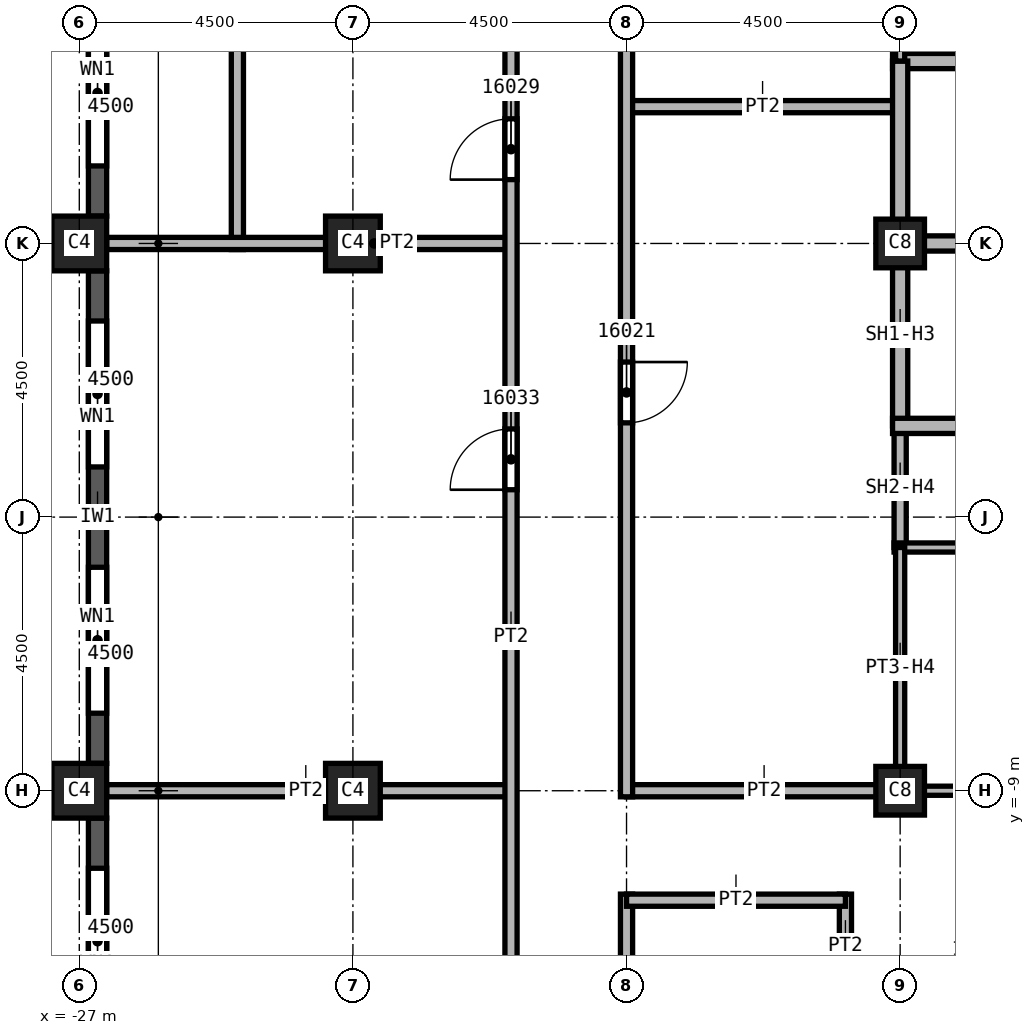
"""IFC4 building model, lengths in metres.
Left out: names, types, materials, properties, quantities, classifications, styles, units other than length and angle.
Written with IfcOpenShell. Run it as: python <this file> out.ifc"""

import sys

from ifc_helpers import new_model, si_unit, direction, frame, frame_2d, origin, origin_2d, place, context, subcontext, project, spatial, rectangle, extrude, element, fill, save


model = new_model("IFC4")
c1 = context("Model", 3, precision=1e-05, world=origin(), true_north=direction((0.0, 1.0)))
c2 = subcontext(c1, "Body", "Model", "MODEL_VIEW")
j1 = project(units=[si_unit("LENGTHUNIT", "METRE"), si_unit("PLANEANGLEUNIT", "RADIAN")], contexts=[c1])
p1 = place(None, origin())
s1 = spatial("IfcSite", under=j1, at=p1, CompositionType="ELEMENT")
p2 = place(p1, origin())
s2 = spatial("IfcBuilding", under=s1, at=p2, CompositionType="ELEMENT")
p3 = place(p2, frame((0.0, 0.0, 246.0)))
s3 = spatial("IfcBuildingStorey", under=s2, at=p3, CompositionType="ELEMENT", Elevation=246.0)
for number, where, z_axis, x_axis in (
    (1, (-22.5, 0.0, 0.0), (0.0, 0.0, 1.0), (1.0, 0.0, 0.0)),
    (2, (-22.5, -9.0, 0.0), (0.0, 0.0, 1.0), (1.0, 0.0, 0.0)),
):
    element("IfcColumn", number, at=place(p3, frame(where, z_axis=z_axis, x_axis=x_axis)), inside=s3, PredefinedType="COLUMN", context=c2, shape_type="SweptSolid", body=[
        extrude(rectangle(XDim=0.9, YDim=0.9, at=origin_2d()), origin(), (0.0, 0.0, 1.0), 3.72),
    ])
for number, where, z_axis, x_axis in (
    (3, (-13.5, 0.0, 0.0), (0.0, 0.0, 1.0), (1.0, 0.0, 0.0)),
    (4, (-13.5, -9.0, 0.0), (0.0, 0.0, 1.0), (1.0, 0.0, 0.0)),
):
    element("IfcColumn", number, at=place(p3, frame(where, z_axis=z_axis, x_axis=x_axis)), inside=s3, PredefinedType="COLUMN", context=c2, shape_type="SweptSolid", body=[
        extrude(rectangle(XDim=0.8, YDim=0.8, at=origin_2d()), origin(), (0.0, 0.0, 1.0), 3.72),
    ])
for number, where, z_axis, x_axis in (
    (5, (-27.0, 0.0, 0.0), (0.0, 0.0, 1.0), (0.0, 1.0, 0.0)),
    (6, (-27.0, -9.0, 0.0), (0.0, 0.0, 1.0), (0.0, 1.0, 0.0)),
):
    element("IfcColumn", number, at=place(p3, frame(where, z_axis=z_axis, x_axis=x_axis)), inside=s3, PredefinedType="COLUMN", context=c2, shape_type="SweptSolid", body=[
        extrude(rectangle(XDim=0.9, YDim=0.9, at=origin_2d()), origin(), (0.0, 0.0, 1.0), 3.72),
    ])
p4 = place(p3, frame((-26.7, 8.55, 0.0), z_axis=(0.0, 0.0, 1.0), x_axis=(0.0, -1.0, 0.0)))
e7 = element("IfcWall", 7, at=p4, inside=s3, PredefinedType="SOLIDWALL", context=c2, shape_type="SweptSolid", body=[
    extrude(rectangle(XDim=8.1, YDim=0.3, at=frame_2d((4.05, 0.0))), origin(), (0.0, 0.0, 1.0), 3.12),
])
p5 = place(p4, frame((0.825, 0.0, 0.8)))
e8 = element("IfcOpeningElement", 8, at=p5, cuts=e7, PredefinedType="OPENING", context=c2, shape_type="SweptSolid", body=[
    extrude(rectangle(XDim=2.4, YDim=1.95, at=frame_2d((1.2, 0.975))), frame((0.0, 0.15, 0.0), z_axis=(0.0, -1.0, 0.0), x_axis=(1.0, 0.0, 0.0)), (0.0, 0.0, 1.0), 0.3),
])
p6 = place(p4, frame((4.875, 0.0, 0.8)))
e9 = element("IfcOpeningElement", 9, at=p6, cuts=e7, PredefinedType="OPENING", context=c2, shape_type="SweptSolid", body=[
    extrude(rectangle(XDim=2.4, YDim=1.95, at=frame_2d((1.2, 0.975))), frame((0.0, 0.15, 0.0), z_axis=(0.0, -1.0, 0.0), x_axis=(1.0, 0.0, 0.0)), (0.0, 0.0, 1.0), 0.3),
])
p7 = place(p3, frame((-26.7, -0.45, 0.0), z_axis=(0.0, 0.0, 1.0), x_axis=(0.0, -1.0, 0.0)))
e10 = element("IfcWall", 10, at=p7, inside=s3, PredefinedType="SOLIDWALL", context=c2, shape_type="SweptSolid", body=[
    extrude(rectangle(XDim=8.1, YDim=0.3, at=frame_2d((4.05, 0.0))), origin(), (0.0, 0.0, 1.0), 3.12),
])
p8 = place(p7, frame((0.825, 0.0, 0.8)))
e11 = element("IfcOpeningElement", 11, at=p8, cuts=e10, PredefinedType="OPENING", context=c2, shape_type="SweptSolid", body=[
    extrude(rectangle(XDim=2.4, YDim=1.95, at=frame_2d((1.2, 0.975))), frame((0.0, 0.15, 0.0), z_axis=(0.0, -1.0, 0.0), x_axis=(1.0, 0.0, 0.0)), (0.0, 0.0, 1.0), 0.3),
])
p9 = place(p7, frame((4.875, 0.0, 0.8)))
e12 = element("IfcOpeningElement", 12, at=p9, cuts=e10, PredefinedType="OPENING", context=c2, shape_type="SweptSolid", body=[
    extrude(rectangle(XDim=2.4, YDim=1.95, at=frame_2d((1.2, 0.975))), frame((0.0, 0.15, 0.0), z_axis=(0.0, -1.0, 0.0), x_axis=(1.0, 0.0, 0.0)), (0.0, 0.0, 1.0), 0.3),
])
p10 = place(p3, frame((-26.7, -9.45, 0.0), z_axis=(0.0, 0.0, 1.0), x_axis=(0.0, -1.0, 0.0)))
e13 = element("IfcWall", 13, at=p10, inside=s3, PredefinedType="SOLIDWALL", context=c2, shape_type="SweptSolid", body=[
    extrude(rectangle(XDim=8.1, YDim=0.3, at=frame_2d((4.05, 0.0))), origin(), (0.0, 0.0, 1.0), 3.12),
])
p11 = place(p10, frame((0.825, 0.0, 0.8)))
e14 = element("IfcOpeningElement", 14, at=p11, cuts=e13, PredefinedType="OPENING", context=c2, shape_type="SweptSolid", body=[
    extrude(rectangle(XDim=2.4, YDim=1.95, at=frame_2d((1.2, 0.975))), frame((0.0, 0.15, 0.0), z_axis=(0.0, -1.0, 0.0), x_axis=(1.0, 0.0, 0.0)), (0.0, 0.0, 1.0), 0.3),
])
p12 = place(p10, frame((4.875, 0.0, 0.8)))
e15 = element("IfcOpeningElement", 15, at=p12, cuts=e13, PredefinedType="OPENING", context=c2, shape_type="SweptSolid", body=[
    extrude(rectangle(XDim=2.4, YDim=1.95, at=frame_2d((1.2, 0.975))), frame((0.0, 0.15, 0.0), z_axis=(0.0, -1.0, 0.0), x_axis=(1.0, 0.0, 0.0)), (0.0, 0.0, 1.0), 0.3),
])
p13 = place(p3, frame((-26.55, -9.0, 0.0), z_axis=(0.0, 0.0, 1.0), x_axis=(1.0, 0.0, 0.0)))
e16 = element("IfcWall", 16, at=p13, inside=s3, PredefinedType="PARTITIONING", context=c2, shape_type="SweptSolid", body=[
    extrude(rectangle(XDim=6.65, YDim=0.2, at=frame_2d((3.325, 0.0))), origin(), (0.0, 0.0, 1.0), 3.72),
])
p14 = place(p3, frame((-24.4, -0.1, 0.0), z_axis=(0.0, 0.0, 1.0), x_axis=(0.0, 1.0, 0.0)))
e17 = element("IfcWall", 17, at=p14, inside=s3, PredefinedType="PARTITIONING", context=c2, shape_type="SweptSolid", body=[
    extrude(rectangle(XDim=17.65, YDim=0.2, at=frame_2d((8.825, 0.0))), origin(), (0.0, 0.0, 1.0), 3.72),
])
p15 = place(p14, frame((14.45, 0.0, 0.0)))
e18 = element("IfcOpeningElement", 18, at=p15, cuts=e17, PredefinedType="OPENING", context=c2, shape_type="SweptSolid", body=[
    extrude(rectangle(XDim=1.0, YDim=2.1, at=frame_2d((0.5, 1.05))), frame((0.0, 0.1, 0.0), z_axis=(0.0, -1.0, 0.0), x_axis=(1.0, 0.0, 0.0)), (0.0, 0.0, 1.0), 0.2),
])
p16 = place(p3, frame((-19.9, 0.0, 0.0), z_axis=(0.0, 0.0, 1.0), x_axis=(-1.0, 0.0, 0.0)))
e19 = element("IfcWall", 19, at=p16, inside=s3, PredefinedType="PARTITIONING", context=c2, shape_type="SweptSolid", body=[
    extrude(rectangle(XDim=6.65, YDim=0.2, at=frame_2d((3.325, 0.0))), origin(), (0.0, 0.0, 1.0), 3.72),
])
p17 = place(p3, frame((-19.9, -21.9, 0.0), z_axis=(0.0, 0.0, 1.0), x_axis=(0.0, 1.0, 0.0)))
e20 = element("IfcWall", 20, at=p17, inside=s3, PredefinedType="PARTITIONING", context=c2, shape_type="SweptSolid", body=[
    extrude(rectangle(XDim=35.5, YDim=0.2, at=frame_2d((17.75, 0.0))), origin(), (0.0, 0.0, 1.0), 3.72),
])
p18 = place(p17, frame((22.95, 0.0, 0.0)))
e21 = element("IfcOpeningElement", 21, at=p18, cuts=e20, PredefinedType="OPENING", context=c2, shape_type="SweptSolid", body=[
    extrude(rectangle(XDim=1.0, YDim=2.1, at=frame_2d((0.5, 1.05))), frame((0.0, 0.1, 0.0), z_axis=(0.0, -1.0, 0.0), x_axis=(1.0, 0.0, 0.0)), (0.0, 0.0, 1.0), 0.2),
])
p19 = place(p17, frame((28.8, 0.0, 0.0)))
e22 = element("IfcOpeningElement", 22, at=p19, cuts=e20, PredefinedType="OPENING", context=c2, shape_type="SweptSolid", body=[
    extrude(rectangle(XDim=1.0, YDim=2.1, at=frame_2d((0.5, 1.05))), frame((0.0, 0.1, 0.0), z_axis=(0.0, -1.0, 0.0), x_axis=(1.0, 0.0, 0.0)), (0.0, 0.0, 1.0), 0.2),
])
p20 = place(p17, frame((7.75, 0.0, 0.0)))
e23 = element("IfcOpeningElement", 23, at=p20, cuts=e20, PredefinedType="OPENING", context=c2, shape_type="SweptSolid", body=[
    extrude(rectangle(XDim=1.0, YDim=2.1, at=frame_2d((0.5, 1.05))), frame((0.0, 0.1, 0.0), z_axis=(0.0, -1.0, 0.0), x_axis=(1.0, 0.0, 0.0)), (0.0, 0.0, 1.0), 0.2),
])
p21 = place(p17, frame((17.85, 0.0, 0.0)))
e24 = element("IfcOpeningElement", 24, at=p21, cuts=e20, PredefinedType="OPENING", context=c2, shape_type="SweptSolid", body=[
    extrude(rectangle(XDim=1.0, YDim=2.1, at=frame_2d((0.5, 1.05))), frame((0.0, 0.1, 0.0), z_axis=(0.0, -1.0, 0.0), x_axis=(1.0, 0.0, 0.0)), (0.0, 0.0, 1.0), 0.2),
])
p22 = place(p3, frame((-18.0, -10.7, 0.0), z_axis=(0.0, 0.0, 1.0), x_axis=(0.0, -1.0, 0.0)))
e25 = element("IfcWall", 25, at=p22, inside=s3, PredefinedType="PARTITIONING", context=c2, shape_type="SweptSolid", body=[
    extrude(rectangle(XDim=11.2, YDim=0.2, at=frame_2d((5.6, 0.0))), origin(), (0.0, 0.0, 1.0), 3.72),
])
p23 = place(p22, frame((5.9, 0.0, 0.0)))
e26 = element("IfcOpeningElement", 26, at=p23, cuts=e25, PredefinedType="OPENING", context=c2, shape_type="SweptSolid", body=[
    extrude(rectangle(XDim=1.0, YDim=2.1, at=frame_2d((0.5, 1.05))), frame((0.0, 0.1, 0.0), z_axis=(0.0, -1.0, 0.0), x_axis=(1.0, 0.0, 0.0)), (0.0, 0.0, 1.0), 0.2),
])
for number, where, z_axis, x_axis in (
    (27, (-18.0, -9.0, 0.0), (0.0, 0.0, 1.0), (1.0, 0.0, 0.0)),
    (28, (-18.0, 2.25, 0.0), (0.0, 0.0, 1.0), (1.0, 0.0, 0.0)),
):
    element("IfcWall", number, at=place(p3, frame(where, z_axis=z_axis, x_axis=x_axis)), inside=s3, PredefinedType="PARTITIONING", context=c2, shape_type="SweptSolid", body=[
        extrude(rectangle(XDim=4.5, YDim=0.2, at=frame_2d((2.25, 0.0))), origin(), (0.0, 0.0, 1.0), 3.72),
    ])
p24 = place(p3, frame((-18.0, 9.1, 0.0), z_axis=(0.0, 0.0, 1.0), x_axis=(0.0, -1.0, 0.0)))
e29 = element("IfcWall", 29, at=p24, inside=s3, PredefinedType="PARTITIONING", context=c2, shape_type="SweptSolid", body=[
    extrude(rectangle(XDim=18.2, YDim=0.2, at=frame_2d((9.1, 0.0))), origin(), (0.0, 0.0, 1.0), 3.72),
])
p25 = place(p24, frame((11.05, 0.0, 0.0)))
e30 = element("IfcOpeningElement", 30, at=p25, cuts=e29, PredefinedType="OPENING", context=c2, shape_type="SweptSolid", body=[
    extrude(rectangle(XDim=1.0, YDim=2.1, at=frame_2d((0.5, 1.05))), frame((0.0, 0.1, 0.0), z_axis=(0.0, -1.0, 0.0), x_axis=(1.0, 0.0, 0.0)), (0.0, 0.0, 1.0), 0.2),
])
p26 = place(p24, frame((1.15, 0.0, 0.0)))
e31 = element("IfcOpeningElement", 31, at=p26, cuts=e29, PredefinedType="OPENING", context=c2, shape_type="SweptSolid", body=[
    extrude(rectangle(XDim=1.0, YDim=2.1, at=frame_2d((0.5, 1.05))), frame((0.0, 0.1, 0.0), z_axis=(0.0, -1.0, 0.0), x_axis=(1.0, 0.0, 0.0)), (0.0, 0.0, 1.0), 0.2),
])
p27 = place(p3, frame((-14.4, -12.3, 0.0), z_axis=(0.0, 0.0, 1.0), x_axis=(0.0, 1.0, 0.0)))
e32 = element("IfcWall", 32, at=p27, inside=s3, PredefinedType="PARTITIONING", context=c2, shape_type="SweptSolid", body=[
    extrude(rectangle(XDim=1.6, YDim=0.2, at=frame_2d((0.8, 0.0))), origin(), (0.0, 0.0, 1.0), 3.72),
])
p28 = place(p3, frame((-14.4, -10.8, 0.0), z_axis=(0.0, 0.0, 1.0), x_axis=(-1.0, 0.0, 0.0)))
e33 = element("IfcWall", 33, at=p28, inside=s3, PredefinedType="PARTITIONING", context=c2, shape_type="SweptSolid", body=[
    extrude(rectangle(XDim=3.6, YDim=0.2, at=frame_2d((1.8, 0.0))), origin(), (0.0, 0.0, 1.0), 3.72),
])
p29 = place(p3, frame((-13.5, -5.0, 0.0), z_axis=(0.0, 0.0, 1.0), x_axis=(0.0, 1.0, 0.0)))
e34 = element("IfcWall", 34, at=p29, inside=s3, PredefinedType="SOLIDWALL", context=c2, shape_type="SweptSolid", body=[
    extrude(rectangle(XDim=2.0, YDim=0.2, at=frame_2d((1.0, 0.0))), origin(), (0.0, 0.0, 1.0), 3.042),
])
p30 = place(p3, frame((-13.625, 0.0, 0.0), z_axis=(0.0, 0.0, 1.0), x_axis=(1.0, 0.0, 0.0)))
e35 = element("IfcWall", 35, at=p30, inside=s3, PredefinedType="SOLIDWALL", context=c2, shape_type="SweptSolid", body=[
    extrude(rectangle(XDim=3.125, YDim=0.25, at=frame_2d((1.562, 0.0))), origin(), (0.0, 0.0, 1.0), 3.72),
])
p31 = place(p3, frame((-13.625, 3.0, 0.0), z_axis=(0.0, 0.0, 1.0), x_axis=(1.0, 0.0, 0.0)))
e36 = element("IfcWall", 36, at=p31, inside=s3, PredefinedType="SOLIDWALL", context=c2, shape_type="SweptSolid", body=[
    extrude(rectangle(XDim=9.25, YDim=0.25, at=frame_2d((4.625, 0.0))), origin(), (0.0, 0.0, 1.0), 3.72),
])
p32 = place(p31, frame((3.25, 0.0, 0.0)))
e37 = element("IfcOpeningElement", 37, at=p32, cuts=e36, PredefinedType="OPENING", context=c2, shape_type="SweptSolid", body=[
    extrude(rectangle(XDim=1.1, YDim=2.1, at=frame_2d((0.55, 1.05))), frame((0.0, 0.125, 0.0), z_axis=(0.0, -1.0, 0.0), x_axis=(1.0, 0.0, 0.0)), (0.0, 0.0, 1.0), 0.25),
])
p33 = place(p3, frame((-13.5, -3.0, 0.0), z_axis=(0.0, 0.0, 1.0), x_axis=(0.0, 1.0, 0.0)))
e38 = element("IfcWall", 38, at=p33, inside=s3, PredefinedType="SOLIDWALL", context=c2, shape_type="SweptSolid", body=[
    extrude(rectangle(XDim=6.0, YDim=0.25, at=frame_2d((3.0, 0.0))), origin(), (0.0, 0.0, 1.0), 3.042),
])
p34 = place(p3, frame((-13.625, -3.0, 0.0), z_axis=(0.0, 0.0, 1.0), x_axis=(1.0, 0.0, 0.0)))
e39 = element("IfcWall", 39, at=p34, inside=s3, PredefinedType="SOLIDWALL", context=c2, shape_type="SweptSolid", body=[
    extrude(rectangle(XDim=6.125, YDim=0.25, at=frame_2d((3.062, 0.0))), origin(), (0.0, 0.0, 1.0), 3.72),
])
p35 = place(p34, frame((3.25, 0.0, 0.0)))
e40 = element("IfcOpeningElement", 40, at=p35, cuts=e39, PredefinedType="OPENING", context=c2, shape_type="SweptSolid", body=[
    extrude(rectangle(XDim=1.1, YDim=2.1, at=frame_2d((0.55, 1.05))), frame((0.0, 0.125, 0.0), z_axis=(0.0, -1.0, 0.0), x_axis=(1.0, 0.0, 0.0)), (0.0, 0.0, 1.0), 0.25),
])
p36 = place(p3, frame((-13.6, -5.0, 0.0), z_axis=(0.0, 0.0, 1.0), x_axis=(1.0, 0.0, 0.0)))
e41 = element("IfcWall", 41, at=p36, inside=s3, PredefinedType="PARTITIONING", context=c2, shape_type="SweptSolid", body=[
    extrude(rectangle(XDim=3.1, YDim=0.15, at=frame_2d((1.55, 0.0))), origin(), (0.0, 0.0, 1.0), 3.72),
])
p37 = place(p3, frame((-13.5, -9.1, 0.0), z_axis=(0.0, 0.0, 1.0), x_axis=(0.0, 1.0, 0.0)))
e42 = element("IfcWall", 42, at=p37, inside=s3, PredefinedType="PARTITIONING", context=c2, shape_type="SweptSolid", body=[
    extrude(rectangle(XDim=4.1, YDim=0.15, at=frame_2d((2.05, 0.0))), origin(), (0.0, 0.0, 1.0), 3.042),
])
p38 = place(p3, frame((-13.5, 3.0, 0.0), z_axis=(0.0, 0.0, 1.0), x_axis=(0.0, 1.0, 0.0)))
e43 = element("IfcWall", 43, at=p38, inside=s3, PredefinedType="PARTITIONING", context=c2, shape_type="SweptSolid", body=[
    extrude(rectangle(XDim=2.0, YDim=0.15, at=frame_2d((1.0, 0.0))), origin(), (0.0, 0.0, 1.0), 3.042),
])
p39 = place(p3, frame((-10.5, -9.0, 0.0), z_axis=(0.0, 0.0, 1.0), x_axis=(-1.0, 0.0, 0.0)))
e44 = element("IfcWall", 44, at=p39, inside=s3, PredefinedType="PARTITIONING", context=c2, shape_type="SweptSolid", body=[
    extrude(rectangle(XDim=3.075, YDim=0.15, at=frame_2d((1.538, 0.0))), origin(), (0.0, 0.0, 1.0), 3.042),
])
p40 = place(p6, origin())
e45 = element("IfcWindow", 45, at=p40, inside=s3, PartitioningType="SINGLE_PANEL", PredefinedType="WINDOW", context=c2, shape_type="SweptSolid", body=[
    extrude(rectangle(XDim=2.4, YDim=1.95, at=frame_2d((1.2, 0.975))), frame((0.0, 0.03, 0.0), z_axis=(0.0, -1.0, 0.0), x_axis=(1.0, 0.0, 0.0)), (0.0, 0.0, 1.0), 0.06),
])
fill(e9, e45)
p41 = place(p8, origin())
e46 = element("IfcWindow", 46, at=p41, inside=s3, PartitioningType="SINGLE_PANEL", PredefinedType="WINDOW", context=c2, shape_type="SweptSolid", body=[
    extrude(rectangle(XDim=2.4, YDim=1.95, at=frame_2d((1.2, 0.975))), frame((0.0, 0.03, 0.0), z_axis=(0.0, -1.0, 0.0), x_axis=(1.0, 0.0, 0.0)), (0.0, 0.0, 1.0), 0.06),
])
fill(e11, e46)
p42 = place(p9, origin())
e47 = element("IfcWindow", 47, at=p42, inside=s3, PartitioningType="SINGLE_PANEL", PredefinedType="WINDOW", context=c2, shape_type="SweptSolid", body=[
    extrude(rectangle(XDim=2.4, YDim=1.95, at=frame_2d((1.2, 0.975))), frame((0.0, 0.03, 0.0), z_axis=(0.0, -1.0, 0.0), x_axis=(1.0, 0.0, 0.0)), (0.0, 0.0, 1.0), 0.06),
])
fill(e12, e47)
p43 = place(p11, origin())
e48 = element("IfcWindow", 48, at=p43, inside=s3, PartitioningType="SINGLE_PANEL", PredefinedType="WINDOW", context=c2, shape_type="SweptSolid", body=[
    extrude(rectangle(XDim=2.4, YDim=1.95, at=frame_2d((1.2, 0.975))), frame((0.0, 0.03, 0.0), z_axis=(0.0, -1.0, 0.0), x_axis=(1.0, 0.0, 0.0)), (0.0, 0.0, 1.0), 0.06),
])
fill(e14, e48)
p44 = place(p25, origin())
e49 = element("IfcDoor", 49, at=p44, inside=s3, OperationType="SINGLE_SWING_RIGHT", PredefinedType="DOOR", context=c2, shape_type="SweptSolid", body=[
    extrude(rectangle(XDim=1.0, YDim=2.1, at=frame_2d((0.5, 1.05))), frame((0.0, 0.025, 0.0), z_axis=(0.0, -1.0, 0.0), x_axis=(1.0, 0.0, 0.0)), (0.0, 0.0, 1.0), 0.05),
])
fill(e30, e49)
p45 = place(p18, origin())
e50 = element("IfcDoor", 50, at=p45, inside=s3, OperationType="SINGLE_SWING_RIGHT", PredefinedType="DOOR", context=c2, shape_type="SweptSolid", body=[
    extrude(rectangle(XDim=1.0, YDim=2.1, at=frame_2d((0.5, 1.05))), frame((0.0, 0.025, 0.0), z_axis=(0.0, -1.0, 0.0), x_axis=(1.0, 0.0, 0.0)), (0.0, 0.0, 1.0), 0.05),
])
fill(e21, e50)
p46 = place(p21, origin())
e51 = element("IfcDoor", 51, at=p46, inside=s3, OperationType="SINGLE_SWING_RIGHT", PredefinedType="DOOR", context=c2, shape_type="SweptSolid", body=[
    extrude(rectangle(XDim=1.0, YDim=2.1, at=frame_2d((0.5, 1.05))), frame((0.0, 0.025, 0.0), z_axis=(0.0, -1.0, 0.0), x_axis=(1.0, 0.0, 0.0)), (0.0, 0.0, 1.0), 0.05),
])
fill(e24, e51)
save(model, sys.argv[1])
